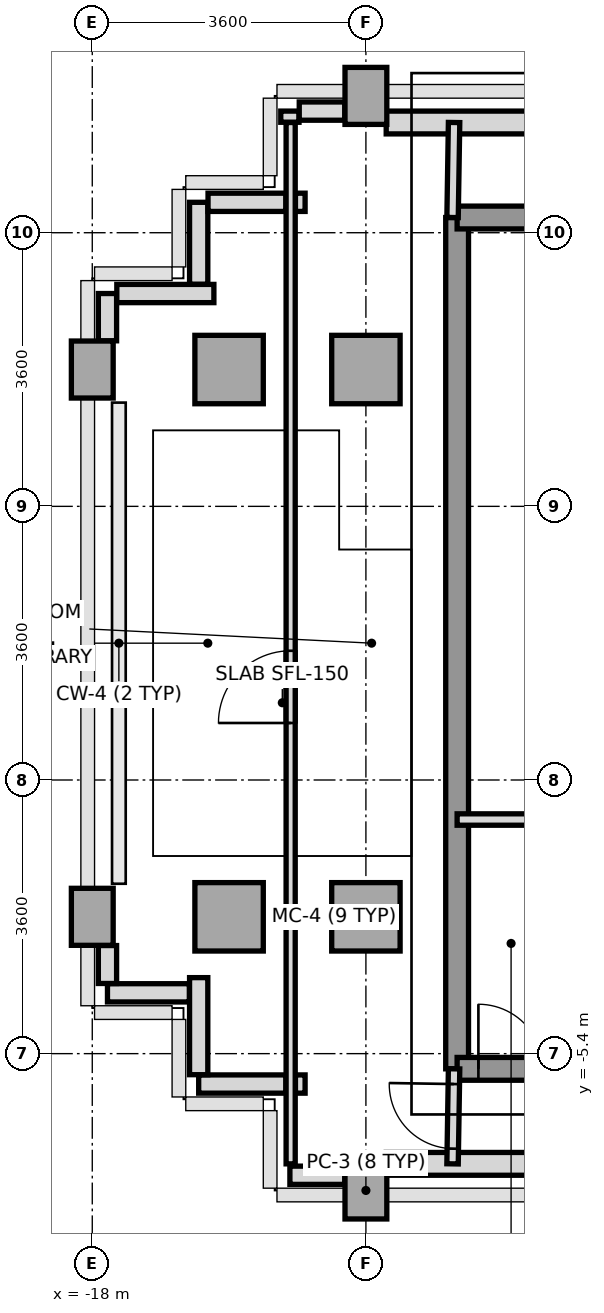
"""IFC4 building model, lengths in metres.
Left out: names, types, materials, properties, quantities, classifications, styles, units other than length and angle.
Written with IfcOpenShell. Run it as: python <this file> out.ifc"""

import sys

from ifc_helpers import new_model, si_unit, direction, frame, frame_2d, origin, origin_2d, place, context, subcontext, project, spatial, rectangle, extrude, source, transform, mapped, element, fill, save


model = new_model("IFC4")
c1 = context("Model", 3, precision=1e-05, world=origin(), true_north=direction((0.0, 1.0)))
c2 = subcontext(c1, "Body", "Model", "MODEL_VIEW")
j1 = project(units=[si_unit("LENGTHUNIT", "METRE"), si_unit("PLANEANGLEUNIT", "RADIAN")], contexts=[c1])
p1 = place(None, origin())
s1 = spatial("IfcSite", under=j1, at=p1, CompositionType="ELEMENT")
p2 = place(p1, origin())
s2 = spatial("IfcBuilding", under=s1, at=p2, CompositionType="ELEMENT")
p3 = place(p2, frame((0.0, 0.0, 223.6)))
s3 = spatial("IfcBuildingStorey", under=s2, at=p3, CompositionType="ELEMENT", Elevation=223.6)
m1 = source(origin(), c2, "Body", "SweptSolid", [
    extrude(rectangle(XDim=0.55, YDim=0.75, at=origin_2d()), origin(), (0.0, 0.0, 1.0), 3.01),
])
for number, where, z_axis, x_axis in (
    (1, (-18.0, -3.6, 0.0), (0.0, 0.0, 1.0), (1.0, 0.0, 0.0)),
    (2, (-18.0, 3.6, 0.0), (0.0, 0.0, 1.0), (1.0, 0.0, 0.0)),
):
    element("IfcColumn", number, at=place(p3, frame(where, z_axis=z_axis, x_axis=x_axis)), inside=s3, PredefinedType="COLUMN", context=c2, shape_type="MappedRepresentation", body=[
        mapped(m1, transform((0.0, 0.0, 0.0), x_axis=(1.0, 0.0, 0.0), y_axis=(0.0, 1.0, 0.0), z_axis=(0.0, 0.0, 1.0), scale=1.0)),
    ])
m2 = source(origin(), c2, "Body", "SweptSolid", [
    extrude(rectangle(XDim=0.9, YDim=0.9, at=origin_2d()), origin(), (0.0, 0.0, 1.0), 3.01),
])
for number, where, z_axis, x_axis in (
    (3, (-16.2, -3.6, 0.0), (0.0, 0.0, 1.0), (1.0, 0.0, 0.0)),
    (4, (-16.2, 3.6, 0.0), (0.0, 0.0, 1.0), (1.0, 0.0, 0.0)),
):
    element("IfcColumn", number, at=place(p3, frame(where, z_axis=z_axis, x_axis=x_axis)), inside=s3, PredefinedType="COLUMN", context=c2, shape_type="MappedRepresentation", body=[
        mapped(m2, transform((0.0, 0.0, 0.0), x_axis=(1.0, 0.0, 0.0), y_axis=(0.0, 1.0, 0.0), z_axis=(0.0, 0.0, 1.0), scale=1.0)),
    ])
p4 = place(p3, frame((-14.4, -7.2, 0.0), z_axis=(0.0, 0.0, 1.0), x_axis=(1.0, 0.0, 0.0)))
e5 = element("IfcColumn", 5, at=p4, inside=s3, PredefinedType="COLUMN", context=c2, shape_type="MappedRepresentation", body=[
    mapped(m1, transform((0.0, 0.0, 0.0), x_axis=(1.0, 0.0, 0.0), y_axis=(0.0, 1.0, 0.0), z_axis=(0.0, 0.0, 1.0), scale=1.0)),
])
for number, where, z_axis, x_axis in (
    (6, (-14.4, -3.6, 0.0), (0.0, 0.0, 1.0), (1.0, 0.0, 0.0)),
    (7, (-14.4, 3.6, 0.0), (0.0, 0.0, 1.0), (1.0, 0.0, 0.0)),
):
    element("IfcColumn", number, at=place(p3, frame(where, z_axis=z_axis, x_axis=x_axis)), inside=s3, PredefinedType="COLUMN", context=c2, shape_type="MappedRepresentation", body=[
        mapped(m2, transform((0.0, 0.0, 0.0), x_axis=(1.0, 0.0, 0.0), y_axis=(0.0, 1.0, 0.0), z_axis=(0.0, 0.0, 1.0), scale=1.0)),
    ])
p5 = place(p3, frame((-14.4, 7.2, 0.0), z_axis=(0.0, 0.0, 1.0), x_axis=(1.0, 0.0, 0.0)))
e8 = element("IfcColumn", 8, at=p5, inside=s3, PredefinedType="COLUMN", context=c2, shape_type="MappedRepresentation", body=[
    mapped(m1, transform((0.0, 0.0, 0.0), x_axis=(1.0, 0.0, 0.0), y_axis=(0.0, 1.0, 0.0), z_axis=(0.0, 0.0, 1.0), scale=1.0)),
])
p6 = place(p3, frame((-14.133, 6.85, 0.0), z_axis=(0.0, 0.0, 1.0), x_axis=(1.0, 0.0, 0.0)))
e9 = element("IfcWall", 9, at=p6, inside=s3, PredefinedType="SOLIDWALL", context=c2, shape_type="SweptSolid", body=[
    extrude(rectangle(XDim=2.685, YDim=0.3, at=frame_2d((1.343, 0.0))), origin(), (0.0, 0.0, 1.0), 2.57),
])
p7 = place(p3, frame((-14.133, -6.85, 0.0), z_axis=(0.0, 0.0, 1.0), x_axis=(1.0, 0.0, 0.0)))
e10 = element("IfcWall", 10, at=p7, inside=s3, PredefinedType="SOLIDWALL", context=c2, shape_type="SweptSolid", body=[
    extrude(rectangle(XDim=2.383, YDim=0.3, at=frame_2d((1.191, 0.0))), origin(), (0.0, 0.0, 1.0), 2.57),
])
p8 = place(p3, frame((-14.678, -7.0, 0.0), z_axis=(0.0, 0.0, 1.0), x_axis=(-1.0, 0.0, 0.0)))
e11 = element("IfcWall", 11, at=p8, inside=s3, PredefinedType="PARAPET", context=c2, shape_type="SweptSolid", body=[
    extrude(rectangle(XDim=0.722, YDim=0.24, at=frame_2d((0.361, 0.0))), origin(), (0.0, 0.0, 1.0), 1.15),
])
p9 = place(p3, frame((-15.2, -5.8, 0.0), z_axis=(0.0, 0.0, 1.0), x_axis=(-1.0, 0.0, 0.0)))
e12 = element("IfcWall", 12, at=p9, inside=s3, PredefinedType="PARAPET", context=c2, shape_type="SweptSolid", body=[
    extrude(rectangle(XDim=0.127, YDim=0.24, at=frame_2d((0.063, 0.0))), origin(), (0.0, 0.0, 1.0), 1.15),
])
p10 = place(p3, frame((-15.453, -5.8, 0.0), z_axis=(0.0, 0.0, 1.0), x_axis=(-1.0, 0.0, 0.0)))
e13 = element("IfcWall", 13, at=p10, inside=s3, PredefinedType="PARAPET", context=c2, shape_type="SweptSolid", body=[
    extrude(rectangle(XDim=1.147, YDim=0.24, at=frame_2d((0.574, 0.0))), origin(), (0.0, 0.0, 1.0), 1.15),
])
p11 = place(p3, frame((-16.6, -5.677, 0.0), z_axis=(0.0, 0.0, 1.0), x_axis=(0.0, 1.0, 0.0)))
e14 = element("IfcWall", 14, at=p11, inside=s3, PredefinedType="PARAPET", context=c2, shape_type="SweptSolid", body=[
    extrude(rectangle(XDim=1.277, YDim=0.24, at=frame_2d((0.639, 0.0))), origin(), (0.0, 0.0, 1.0), 1.15),
])
p12 = place(p3, frame((-16.723, -4.6, 0.0), z_axis=(0.0, 0.0, 1.0), x_axis=(-1.0, 0.0, 0.0)))
e15 = element("IfcWall", 15, at=p12, inside=s3, PredefinedType="PARAPET", context=c2, shape_type="SweptSolid", body=[
    extrude(rectangle(XDim=1.077, YDim=0.24, at=frame_2d((0.539, 0.0))), origin(), (0.0, 0.0, 1.0), 1.15),
])
p13 = place(p3, frame((-17.8, -4.477, 0.0), z_axis=(0.0, 0.0, 1.0), x_axis=(0.0, 1.0, 0.0)))
e16 = element("IfcWall", 16, at=p13, inside=s3, PredefinedType="PARAPET", context=c2, shape_type="SweptSolid", body=[
    extrude(rectangle(XDim=0.499, YDim=0.24, at=frame_2d((0.25, 0.0))), origin(), (0.0, 0.0, 1.0), 1.15),
])
p14 = place(p3, frame((-17.8, 3.978, 0.0), z_axis=(0.0, 0.0, 1.0), x_axis=(0.0, 1.0, 0.0)))
e17 = element("IfcWall", 17, at=p14, inside=s3, PredefinedType="PARAPET", context=c2, shape_type="SweptSolid", body=[
    extrude(rectangle(XDim=0.622, YDim=0.24, at=frame_2d((0.311, 0.0))), origin(), (0.0, 0.0, 1.0), 1.15),
])
p15 = place(p3, frame((-17.677, 4.6, 0.0), z_axis=(0.0, 0.0, 1.0), x_axis=(1.0, 0.0, 0.0)))
e18 = element("IfcWall", 18, at=p15, inside=s3, PredefinedType="PARAPET", context=c2, shape_type="SweptSolid", body=[
    extrude(rectangle(XDim=1.277, YDim=0.24, at=frame_2d((0.639, 0.0))), origin(), (0.0, 0.0, 1.0), 1.15),
])
p16 = place(p3, frame((-16.6, 4.723, 0.0), z_axis=(0.0, 0.0, 1.0), x_axis=(0.0, 1.0, 0.0)))
e19 = element("IfcWall", 19, at=p16, inside=s3, PredefinedType="PARAPET", context=c2, shape_type="SweptSolid", body=[
    extrude(rectangle(XDim=1.077, YDim=0.24, at=frame_2d((0.539, 0.0))), origin(), (0.0, 0.0, 1.0), 1.15),
])
p17 = place(p3, frame((-16.477, 5.8, 0.0), z_axis=(0.0, 0.0, 1.0), x_axis=(1.0, 0.0, 0.0)))
e20 = element("IfcWall", 20, at=p17, inside=s3, PredefinedType="PARAPET", context=c2, shape_type="SweptSolid", body=[
    extrude(rectangle(XDim=1.024, YDim=0.24, at=frame_2d((0.512, 0.0))), origin(), (0.0, 0.0, 1.0), 1.15),
])
p18 = place(p3, frame((-15.327, 5.8, 0.0), z_axis=(0.0, 0.0, 1.0), x_axis=(1.0, 0.0, 0.0)))
e21 = element("IfcWall", 21, at=p18, inside=s3, PredefinedType="PARAPET", context=c2, shape_type="SweptSolid", body=[
    extrude(rectangle(XDim=0.127, YDim=0.24, at=frame_2d((0.063, 0.0))), origin(), (0.0, 0.0, 1.0), 1.15),
])
p19 = place(p3, frame((-15.4, 6.853, 0.0), z_axis=(0.0, 0.0, 1.0), x_axis=(0.0, 1.0, 0.0)))
e22 = element("IfcWall", 22, at=p19, inside=s3, PredefinedType="PARAPET", context=c2, shape_type="SweptSolid", body=[
    extrude(rectangle(XDim=0.147, YDim=0.24, at=frame_2d((0.073, 0.0))), origin(), (0.0, 0.0, 1.0), 1.15),
])
p20 = place(p3, frame((-15.277, 7.0, 0.0), z_axis=(0.0, 0.0, 1.0), x_axis=(1.0, 0.0, 0.0)))
e23 = element("IfcWall", 23, at=p20, inside=s3, PredefinedType="PARAPET", context=c2, shape_type="SweptSolid", body=[
    extrude(rectangle(XDim=0.599, YDim=0.24, at=frame_2d((0.3, 0.0))), origin(), (0.0, 0.0, 1.0), 1.15),
])
p21 = place(p3, frame((-13.2, -5.6, 0.0), z_axis=(0.0, 0.0, 1.0), x_axis=(0.0, 1.0, 0.0)))
e24 = element("IfcWall", 24, at=p21, inside=s3, PredefinedType="SHEAR", context=c2, shape_type="SweptSolid", body=[
    extrude(rectangle(XDim=11.2, YDim=0.3, at=frame_2d((5.6, 0.0))), origin(), (0.0, 0.0, 1.0), 3.01),
])
p22 = place(p3, frame((-13.2, 5.6, 0.0), z_axis=(0.0, 0.0, 1.0), x_axis=(1.0, 0.0, 0.0)))
e25 = element("IfcWall", 25, at=p22, inside=s3, PredefinedType="SHEAR", context=c2, shape_type="SweptSolid", body=[
    extrude(rectangle(XDim=1.844, YDim=0.3, at=frame_2d((0.922, 0.0))), origin(), (0.0, 0.0, 1.0), 3.01),
])
p23 = place(p3, frame((-13.2, -5.6, 0.0), z_axis=(0.0, 0.0, 1.0), x_axis=(1.0, 0.0, 0.0)))
e26 = element("IfcWall", 26, at=p23, inside=s3, PredefinedType="SHEAR", context=c2, shape_type="SweptSolid", body=[
    extrude(rectangle(XDim=7.8, YDim=0.3, at=frame_2d((3.9, 0.0))), origin(), (0.0, 0.0, 1.0), 3.01),
])
p24 = place(p23, frame((0.28, 0.0, 0.0)))
e27 = element("IfcOpeningElement", 27, at=p24, cuts=e26, PredefinedType="OPENING", context=c2, shape_type="SweptSolid", body=[
    extrude(rectangle(XDim=0.85, YDim=2.1, at=frame_2d((0.425, 1.05))), frame((0.0, 0.16, 0.0), z_axis=(0.0, -1.0, 0.0), x_axis=(1.0, 0.0, 0.0)), (0.0, 0.0, 1.0), 0.32),
])
p25 = place(p23, frame((1.36, 0.0, 0.0)))
e28 = element("IfcOpeningElement", 28, at=p25, cuts=e26, PredefinedType="OPENING", context=c2, shape_type="SweptSolid", body=[
    extrude(rectangle(XDim=0.85, YDim=2.1, at=frame_2d((0.425, 1.05))), frame((0.0, 0.16, 0.0), z_axis=(0.0, -1.0, 0.0), x_axis=(1.0, 0.0, 0.0)), (0.0, 0.0, 1.0), 0.32),
])
p26 = place(p23, frame((2.85, 0.0, 0.0)))
e29 = element("IfcOpeningElement", 29, at=p26, cuts=e26, PredefinedType="OPENING", context=c2, shape_type="SweptSolid", body=[
    extrude(rectangle(XDim=0.85, YDim=2.1, at=frame_2d((0.425, 1.05))), frame((0.0, 0.16, 0.0), z_axis=(0.0, -1.0, 0.0), x_axis=(1.0, 0.0, 0.0)), (0.0, 0.0, 1.0), 0.32),
])
p27 = place(p23, frame((4.55, 0.0, 0.0)))
e30 = element("IfcOpeningElement", 30, at=p27, cuts=e26, PredefinedType="OPENING", context=c2, shape_type="SweptSolid", body=[
    extrude(rectangle(XDim=0.85, YDim=2.1, at=frame_2d((0.425, 1.05))), frame((0.0, 0.16, 0.0), z_axis=(0.0, -1.0, 0.0), x_axis=(1.0, 0.0, 0.0)), (0.0, 0.0, 1.0), 0.32),
])
p28 = place(p23, frame((6.25, 0.0, 0.0)))
e31 = element("IfcOpeningElement", 31, at=p28, cuts=e26, PredefinedType="OPENING", context=c2, shape_type="SweptSolid", body=[
    extrude(rectangle(XDim=0.85, YDim=2.1, at=frame_2d((0.425, 1.05))), frame((0.0, 0.16, 0.0), z_axis=(0.0, -1.0, 0.0), x_axis=(1.0, 0.0, 0.0)), (0.0, 0.0, 1.0), 0.32),
])
p29 = place(p3, frame((-13.2, -2.32, 0.0), z_axis=(0.0, 0.0, 1.0), x_axis=(1.0, 0.0, 0.0)))
e32 = element("IfcWall", 32, at=p29, inside=s3, PredefinedType="PARTITIONING", context=c2, shape_type="SweptSolid", body=[
    extrude(rectangle(XDim=2.18, YDim=0.15, at=frame_2d((1.09, 0.0))), origin(), (0.0, 0.0, 1.0), 3.01),
])
p30 = place(p3, frame((-13.26, 5.6, 0.0), z_axis=(0.0, 0.0, 1.0), x_axis=(0.016013571389, 0.999871774545, 0.0)))
e33 = element("IfcWall", 33, at=p30, inside=s3, PredefinedType="PARTITIONING", context=c2, shape_type="SweptSolid", body=[
    extrude(rectangle(XDim=1.25, YDim=0.15, at=frame_2d((0.625, 0.0))), origin(), (0.0, 0.0, 1.0), 3.01),
])
p31 = place(p3, frame((-13.26, -6.85, 0.0), z_axis=(0.0, 0.0, 1.0), x_axis=(0.016013571389, 0.999871774545, 0.0)))
e34 = element("IfcWall", 34, at=p31, inside=s3, PredefinedType="PARTITIONING", context=c2, shape_type="SweptSolid", body=[
    extrude(rectangle(XDim=1.25, YDim=0.15, at=frame_2d((0.625, 0.0))), origin(), (0.0, 0.0, 1.0), 3.01),
])
p32 = place(p31, frame((0.2, 0.0, 0.0)))
e35 = element("IfcOpeningElement", 35, at=p32, cuts=e34, PredefinedType="OPENING", context=c2, shape_type="SweptSolid", body=[
    extrude(rectangle(XDim=0.85, YDim=2.1, at=frame_2d((0.425, 1.05))), frame((0.0, 0.085, 0.0), z_axis=(0.0, -1.0, 0.0), x_axis=(1.0, 0.0, 0.0)), (0.0, 0.0, 1.0), 0.17),
])
p33 = place(p3, frame((-15.39, -6.85, 0.0), z_axis=(0.0, 0.0, 1.0), x_axis=(0.0, 1.0, 0.0)))
e36 = element("IfcWall", 36, at=p33, inside=s3, PredefinedType="PARTITIONING", context=c2, shape_type="SweptSolid", body=[
    extrude(rectangle(XDim=13.7, YDim=0.12, at=frame_2d((6.85, 0.0))), origin(), (0.0, 0.0, 1.0), 3.01),
])
p34 = place(p33, frame((5.8, 0.0, 0.0)))
e37 = element("IfcOpeningElement", 37, at=p34, cuts=e36, PredefinedType="OPENING", context=c2, shape_type="SweptSolid", body=[
    extrude(rectangle(XDim=0.95, YDim=2.15, at=frame_2d((0.475, 1.075))), frame((0.0, 0.07, 0.0), z_axis=(0.0, -1.0, 0.0), x_axis=(1.0, 0.0, 0.0)), (0.0, 0.0, 1.0), 0.14),
])
m3 = source(origin(), c2, "Body", "SweptSolid", [
    extrude(rectangle(XDim=0.85, YDim=2.1, at=frame_2d((0.425, 1.05))), frame((0.0, 0.025, 0.0), z_axis=(0.0, -1.0, 0.0), x_axis=(1.0, 0.0, 0.0)), (0.0, 0.0, 1.0), 0.05),
])
p35 = place(p24, origin())
e38 = element("IfcDoor", 38, at=p35, inside=s3, OperationType="SINGLE_SWING_LEFT", PredefinedType="DOOR", context=c2, shape_type="MappedRepresentation", body=[
    mapped(m3, transform((0.0, 0.0, 0.0), x_axis=(1.0, 0.0, 0.0), y_axis=(0.0, 1.0, 0.0), z_axis=(0.0, 0.0, 1.0), scale=1.0)),
])
fill(e27, e38)
p36 = place(p32, origin())
e39 = element("IfcDoor", 39, at=p36, inside=s3, OperationType="SINGLE_SWING_RIGHT", PredefinedType="DOOR", context=c2, shape_type="MappedRepresentation", body=[
    mapped(m3, transform((0.0, 0.0, 0.0), x_axis=(1.0, 0.0, 0.0), y_axis=(0.0, 1.0, 0.0), z_axis=(0.0, 0.0, 1.0), scale=1.0)),
])
fill(e35, e39)
m4 = source(origin(), c2, "Body", "SweptSolid", [
    extrude(rectangle(XDim=0.95, YDim=2.15, at=frame_2d((0.475, 1.075))), frame((0.0, 0.025, 0.0), z_axis=(0.0, -1.0, 0.0), x_axis=(1.0, 0.0, 0.0)), (0.0, 0.0, 1.0), 0.05),
])
p37 = place(p34, origin())
e40 = element("IfcDoor", 40, at=p37, inside=s3, OperationType="SINGLE_SWING_LEFT", PredefinedType="DOOR", context=c2, shape_type="MappedRepresentation", body=[
    mapped(m4, transform((0.0, 0.0, 0.0), x_axis=(1.0, 0.0, 0.0), y_axis=(0.0, 1.0, 0.0), z_axis=(0.0, 0.0, 1.0), scale=1.0)),
])
fill(e37, e40)
save(model, sys.argv[1])
